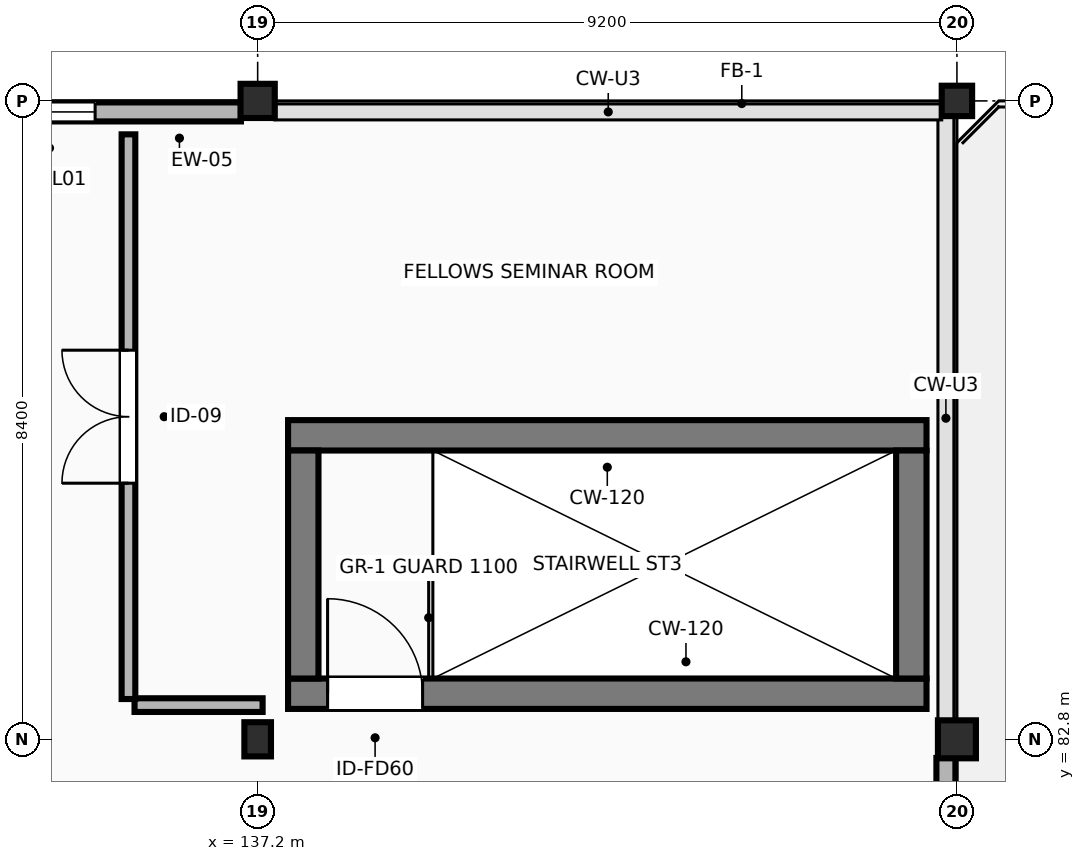
"""IFC4 building model, lengths in metres.
Left out: names, types, materials, properties, quantities, classifications, styles, units other than length and angle.
Written with IfcOpenShell. Run it as: python <this file> out.ifc"""

import sys

from ifc_helpers import new_model, si_unit, direction, frame, frame_2d, origin, origin_2d, place, context, subcontext, project, spatial, rectangle, extrude, element, fill, save


model = new_model("IFC4")
c1 = context("Model", 3, precision=1e-05, world=origin(), true_north=direction((0.0, 1.0)))
c2 = subcontext(c1, "Body", "Model", "MODEL_VIEW")
j1 = project(units=[si_unit("LENGTHUNIT", "METRE"), si_unit("PLANEANGLEUNIT", "RADIAN")], contexts=[c1])
p1 = place(None, origin())
s1 = spatial("IfcSite", under=j1, at=p1, CompositionType="ELEMENT")
p2 = place(p1, origin())
s2 = spatial("IfcBuilding", under=s1, at=p2, CompositionType="ELEMENT")
p3 = place(p2, frame((0.0, 0.0, 13.8)))
s3 = spatial("IfcBuildingStorey", under=s2, at=p3, CompositionType="ELEMENT", Elevation=13.8)
p4 = place(p3, frame((137.2, 82.8, 0.0), z_axis=(0.0, 0.0, 1.0), x_axis=(1.0, 0.0, 0.0)))
e1 = element("IfcColumn", 1, at=p4, inside=s3, PredefinedType="COLUMN", context=c2, shape_type="SweptSolid", body=[
    extrude(rectangle(XDim=0.35, YDim=0.45, at=origin_2d()), origin(), (0.0, 0.0, 1.0), 4.2),
])
p5 = place(p3, frame((137.2, 91.2, 0.0), z_axis=(0.0, 0.0, 1.0), x_axis=(1.0, 0.0, 0.0)))
e2 = element("IfcColumn", 2, at=p5, inside=s3, PredefinedType="COLUMN", context=c2, shape_type="SweptSolid", body=[
    extrude(rectangle(XDim=0.45, YDim=0.45, at=origin_2d()), origin(), (0.0, 0.0, 1.0), 4.2),
])
p6 = place(p3, frame((146.4, 82.8, 0.0), z_axis=(0.0, 0.0, 1.0), x_axis=(1.0, 0.0, 0.0)))
e3 = element("IfcColumn", 3, at=p6, inside=s3, PredefinedType="COLUMN", context=c2, shape_type="SweptSolid", body=[
    extrude(rectangle(XDim=0.5, YDim=0.5, at=origin_2d()), origin(), (0.0, 0.0, 1.0), 4.2),
])
p7 = place(p3, frame((146.4, 91.2, 0.0), z_axis=(0.0, 0.0, 1.0), x_axis=(1.0, 0.0, 0.0)))
e4 = element("IfcColumn", 4, at=p7, inside=s3, PredefinedType="COLUMN", context=c2, shape_type="SweptSolid", body=[
    extrude(rectangle(XDim=0.4, YDim=0.4, at=origin_2d()), origin(), (0.0, 0.0, 1.0), 4.2),
])
p8 = place(p3, frame((146.255, 73.445, 0.0), z_axis=(0.0, 0.0, 1.0), x_axis=(0.0, 1.0, 0.0)))
e5 = element("IfcWall", 5, at=p8, inside=s3, PredefinedType="STANDARD", context=c2, shape_type="SweptSolid", body=[
    extrude(rectangle(XDim=9.11, YDim=0.25, at=frame_2d((4.555, 0.0))), origin(), (0.0, 0.0, 1.0), 3.92),
])
p9 = place(p8, frame((3.98, 0.0, 0.0)))
e6 = element("IfcOpeningElement", 6, at=p9, cuts=e5, PredefinedType="OPENING", context=c2, shape_type="SweptSolid", body=[
    extrude(rectangle(XDim=1.15, YDim=2.2, at=frame_2d((0.575, 1.1))), frame((0.0, 0.135, 0.0), z_axis=(0.0, -1.0, 0.0), x_axis=(1.0, 0.0, 0.0)), (0.0, 0.0, 1.0), 0.27),
])
p10 = place(p3, frame((136.98, 91.055, 0.0), z_axis=(0.0, 0.0, 1.0), x_axis=(-1.0, 0.0, 0.0)))
e7 = element("IfcWall", 7, at=p10, inside=s3, PredefinedType="STANDARD", context=c2, shape_type="SweptSolid", body=[
    extrude(rectangle(XDim=8.395, YDim=0.25, at=frame_2d((4.198, 0.0))), origin(), (0.0, 0.0, 1.0), 3.22),
])
p11 = place(p10, frame((1.918, 0.0, 0.95)))
e8 = element("IfcOpeningElement", 8, at=p11, cuts=e7, PredefinedType="OPENING", context=c2, shape_type="SweptSolid", body=[
    extrude(rectangle(XDim=1.2, YDim=1.5, at=frame_2d((0.6, 0.75))), frame((0.0, 0.135, 0.0), z_axis=(0.0, -1.0, 0.0), x_axis=(1.0, 0.0, 0.0)), (0.0, 0.0, 1.0), 0.27),
])
p12 = place(p10, frame((5.277, 0.0, 0.95)))
e9 = element("IfcOpeningElement", 9, at=p12, cuts=e7, PredefinedType="OPENING", context=c2, shape_type="SweptSolid", body=[
    extrude(rectangle(XDim=1.2, YDim=1.5, at=frame_2d((0.6, 0.75))), frame((0.0, 0.135, 0.0), z_axis=(0.0, -1.0, 0.0), x_axis=(1.0, 0.0, 0.0)), (0.0, 0.0, 1.0), 0.27),
])
p13 = place(p3, frame((137.6, 83.4, 0.0), z_axis=(0.0, 0.0, 1.0), x_axis=(1.0, 0.0, 0.0)))
e10 = element("IfcWall", 10, at=p13, inside=s3, PredefinedType="SHEAR", context=c2, shape_type="SweptSolid", body=[
    extrude(rectangle(XDim=8.4, YDim=0.4, at=frame_2d((4.2, 0.0))), origin(), (0.0, 0.0, 1.0), 3.92),
])
p14 = place(p13, frame((0.52, 0.0, 0.0)))
e11 = element("IfcOpeningElement", 11, at=p14, cuts=e10, PredefinedType="OPENING", context=c2, shape_type="SweptSolid", body=[
    extrude(rectangle(XDim=1.25, YDim=2.2, at=frame_2d((0.625, 1.1))), frame((0.0, 0.21, 0.0), z_axis=(0.0, -1.0, 0.0), x_axis=(1.0, 0.0, 0.0)), (0.0, 0.0, 1.0), 0.42),
])
p15 = place(p3, frame((146.0, 86.8, 0.0), z_axis=(0.0, 0.0, 1.0), x_axis=(-1.0, 0.0, 0.0)))
e12 = element("IfcWall", 12, at=p15, inside=s3, PredefinedType="SHEAR", context=c2, shape_type="SweptSolid", body=[
    extrude(rectangle(XDim=8.4, YDim=0.4, at=frame_2d((4.2, 0.0))), origin(), (0.0, 0.0, 1.0), 3.92),
])
for number, where, z_axis, x_axis in (
    (13, (137.8, 83.6, 0.0), (0.0, 0.0, 1.0), (0.0, 1.0, 0.0)),
    (14, (145.8, 86.6, 0.0), (0.0, 0.0, 1.0), (0.0, -1.0, 0.0)),
):
    element("IfcWall", number, at=place(p3, frame(where, z_axis=z_axis, x_axis=x_axis)), inside=s3, PredefinedType="SHEAR", context=c2, shape_type="SweptSolid", body=[
        extrude(rectangle(XDim=3.0, YDim=0.4, at=frame_2d((1.5, 0.0))), origin(), (0.0, 0.0, 1.0), 3.92),
    ])
p16 = place(p3, frame((137.265, 83.25, 0.0), z_axis=(0.0, 0.0, 1.0), x_axis=(-1.0, 0.0, 0.0)))
e15 = element("IfcWall", 15, at=p16, inside=s3, PredefinedType="PARTITIONING", context=c2, shape_type="SweptSolid", body=[
    extrude(rectangle(XDim=1.685, YDim=0.18, at=frame_2d((0.842, 0.0))), origin(), (0.0, 0.0, 1.0), 3.26),
])
p17 = place(p3, frame((135.5, 83.33, 0.0), z_axis=(0.0, 0.0, 1.0), x_axis=(0.0, 1.0, 0.0)))
e16 = element("IfcWall", 16, at=p17, inside=s3, PredefinedType="PARTITIONING", context=c2, shape_type="SweptSolid", body=[
    extrude(rectangle(XDim=7.43, YDim=0.18, at=frame_2d((3.715, 0.0))), origin(), (0.0, 0.0, 1.0), 3.92),
])
p18 = place(p17, frame((2.84, 0.0, 0.0)))
e17 = element("IfcOpeningElement", 17, at=p18, cuts=e16, PredefinedType="OPENING", context=c2, shape_type="SweptSolid", body=[
    extrude(rectangle(XDim=1.75, YDim=2.35, at=frame_2d((0.875, 1.175))), frame((0.0, 0.1, 0.0), z_axis=(0.0, -1.0, 0.0), x_axis=(1.0, 0.0, 0.0)), (0.0, 0.0, 1.0), 0.2),
])
p19 = place(p11, origin())
e18 = element("IfcWindow", 18, at=p19, inside=s3, PartitioningType="SINGLE_PANEL", PredefinedType="WINDOW", context=c2, shape_type="SweptSolid", body=[
    extrude(rectangle(XDim=1.2, YDim=1.5, at=frame_2d((0.6, 0.75))), frame((0.0, 0.03, 0.0), z_axis=(0.0, -1.0, 0.0), x_axis=(1.0, 0.0, 0.0)), (0.0, 0.0, 1.0), 0.06),
])
fill(e8, e18)
p20 = place(p14, origin())
e19 = element("IfcDoor", 19, at=p20, inside=s3, OperationType="SINGLE_SWING_LEFT", PredefinedType="DOOR", context=c2, shape_type="SweptSolid", body=[
    extrude(rectangle(XDim=1.25, YDim=2.2, at=frame_2d((0.625, 1.1))), frame((0.0, 0.025, 0.0), z_axis=(0.0, -1.0, 0.0), x_axis=(1.0, 0.0, 0.0)), (0.0, 0.0, 1.0), 0.05),
])
fill(e11, e19)
p21 = place(p18, origin())
e20 = element("IfcDoor", 20, at=p21, inside=s3, OperationType="DOUBLE_DOOR_SINGLE_SWING", PredefinedType="DOOR", context=c2, shape_type="SweptSolid", body=[
    extrude(rectangle(XDim=1.75, YDim=2.35, at=frame_2d((0.875, 1.175))), frame((0.0, 0.025, 0.0), z_axis=(0.0, -1.0, 0.0), x_axis=(1.0, 0.0, 0.0)), (0.0, 0.0, 1.0), 0.05),
])
fill(e17, e20)
save(model, sys.argv[1])
